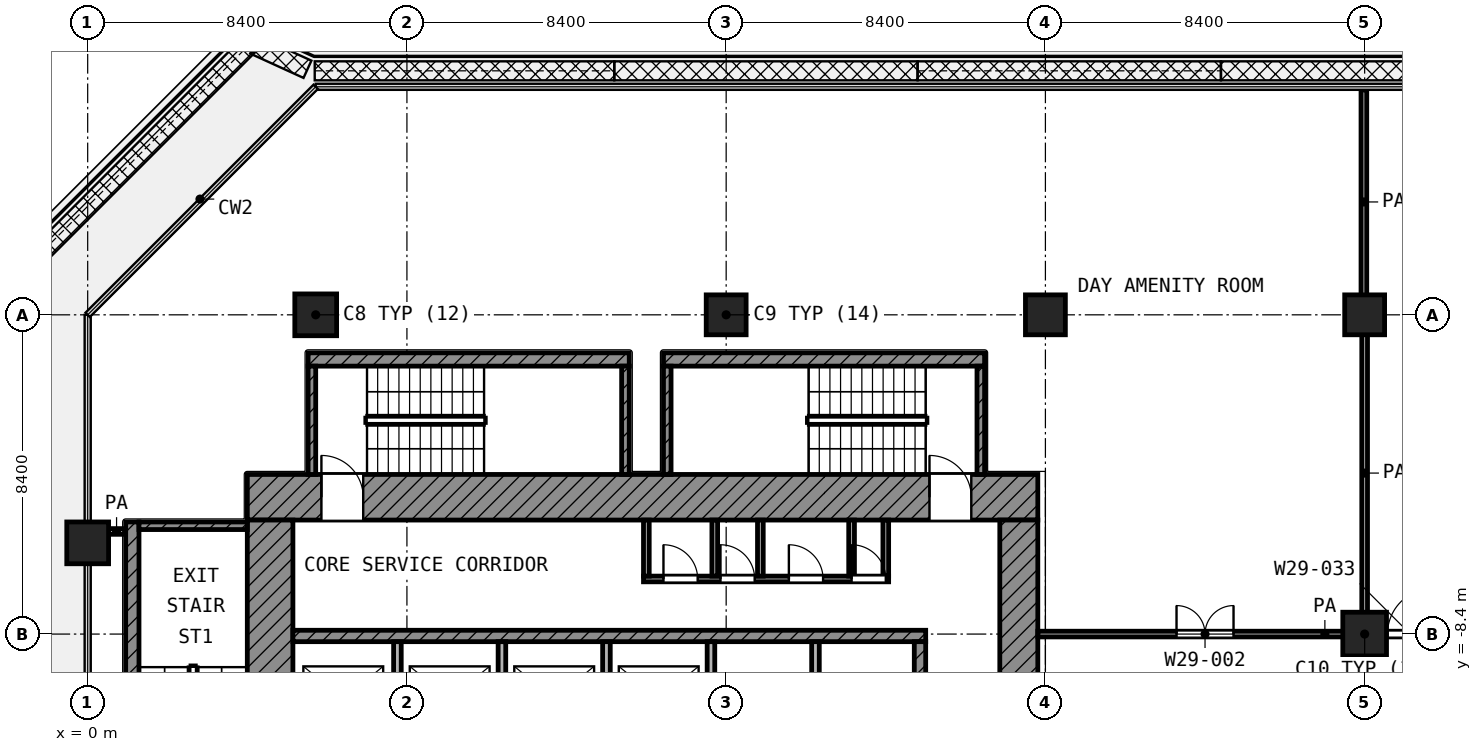
"""IFC4 building model, lengths in metres.
Left out: names, types, materials, properties, quantities, classifications, styles, units other than length and angle.
Written with IfcOpenShell. Run it as: python <this file> out.ifc"""

import sys

from ifc_helpers import new_model, si_unit, direction, frame, frame_2d, origin, origin_2d, place, context, subcontext, project, spatial, rectangle, extrude, element, fill, save


model = new_model("IFC4")
c1 = context("Model", 3, precision=1e-05, world=origin(), true_north=direction((0.0, 1.0)))
c2 = subcontext(c1, "Body", "Model", "MODEL_VIEW")
j1 = project(units=[si_unit("LENGTHUNIT", "METRE"), si_unit("PLANEANGLEUNIT", "RADIAN")], contexts=[c1])
p1 = place(None, origin())
s1 = spatial("IfcSite", under=j1, at=p1, CompositionType="ELEMENT")
p2 = place(p1, origin())
s2 = spatial("IfcBuilding", under=s1, at=p2, CompositionType="ELEMENT")
p3 = place(p2, frame((0.0, 0.0, 128.2)))
s3 = spatial("IfcBuildingStorey", under=s2, at=p3, CompositionType="ELEMENT", Elevation=128.2)
p4 = place(p3, frame((6.0, 0.0, 0.0), z_axis=(0.0, 0.0, 1.0), x_axis=(1.0, 0.0, 0.0)))
e1 = element("IfcColumn", 1, at=p4, inside=s3, PredefinedType="COLUMN", context=c2, shape_type="SweptSolid", body=[
    extrude(rectangle(XDim=1.1, YDim=1.1, at=origin_2d()), origin(), (0.0, 0.0, 1.0), 4.2),
])
for number, where, z_axis, x_axis in (
    (2, (16.8, 0.0, 0.0), (0.0, 0.0, 1.0), (1.0, 0.0, 0.0)),
    (3, (25.2, 0.0, 0.0), (0.0, 0.0, 1.0), (1.0, 0.0, 0.0)),
    (4, (33.6, 0.0, 0.0), (0.0, 0.0, 1.0), (1.0, 0.0, 0.0)),
):
    element("IfcColumn", number, at=place(p3, frame(where, z_axis=z_axis, x_axis=x_axis)), inside=s3, PredefinedType="COLUMN", context=c2, shape_type="SweptSolid", body=[
        extrude(rectangle(XDim=1.05, YDim=1.05, at=origin_2d()), origin(), (0.0, 0.0, 1.0), 4.2),
    ])
p5 = place(p3, frame((0.0, -6.0, 0.0), z_axis=(0.0, 0.0, 1.0), x_axis=(1.0, 0.0, 0.0)))
e5 = element("IfcColumn", 5, at=p5, inside=s3, PredefinedType="COLUMN", context=c2, shape_type="SweptSolid", body=[
    extrude(rectangle(XDim=1.1, YDim=1.1, at=origin_2d()), origin(), (0.0, 0.0, 1.0), 4.2),
])
p6 = place(p3, frame((33.6, -8.4, 0.0), z_axis=(0.0, 0.0, 1.0), x_axis=(1.0, 0.0, 0.0)))
e6 = element("IfcColumn", 6, at=p6, inside=s3, PredefinedType="COLUMN", context=c2, shape_type="SweptSolid", body=[
    extrude(rectangle(XDim=1.15, YDim=1.15, at=origin_2d()), origin(), (0.0, 0.0, 1.0), 4.2),
])
p7 = place(p3, frame((4.2, -4.8, 0.0), z_axis=(0.0, 0.0, 1.0), x_axis=(1.0, 0.0, 0.0)))
e7 = element("IfcWall", 7, at=p7, inside=s3, PredefinedType="SHEAR", context=c2, shape_type="SweptSolid", body=[
    extrude(rectangle(XDim=20.8, YDim=1.2, at=frame_2d((10.4, 0.0))), origin(), (0.0, 0.0, 1.0), 3.6),
])
p8 = place(p7, frame((1.95, 0.0, 0.0)))
e8 = element("IfcOpeningElement", 8, at=p8, cuts=e7, PredefinedType="OPENING", context=c2, shape_type="SweptSolid", body=[
    extrude(rectangle(XDim=1.1, YDim=2.1, at=frame_2d((0.55, 1.05))), frame((0.0, 0.61, 0.0), z_axis=(0.0, -1.0, 0.0), x_axis=(1.0, 0.0, 0.0)), (0.0, 0.0, 1.0), 1.22),
])
p9 = place(p7, frame((17.95, 0.0, 0.0)))
e9 = element("IfcOpeningElement", 9, at=p9, cuts=e7, PredefinedType="OPENING", context=c2, shape_type="SweptSolid", body=[
    extrude(rectangle(XDim=1.1, YDim=2.1, at=frame_2d((0.55, 1.05))), frame((0.0, 0.61, 0.0), z_axis=(0.0, -1.0, 0.0), x_axis=(1.0, 0.0, 0.0)), (0.0, 0.0, 1.0), 1.22),
])
p10 = place(p3, frame((4.8, -25.0, 0.0), z_axis=(0.0, 0.0, 1.0), x_axis=(0.0, 1.0, 0.0)))
e10 = element("IfcWall", 10, at=p10, inside=s3, PredefinedType="SHEAR", context=c2, shape_type="SweptSolid", body=[
    extrude(rectangle(XDim=19.6, YDim=1.2, at=frame_2d((9.8, 0.0))), origin(), (0.0, 0.0, 1.0), 3.6),
])
p11 = place(p10, frame((11.45, 0.0, 0.0)))
e11 = element("IfcOpeningElement", 11, at=p11, cuts=e10, PredefinedType="OPENING", context=c2, shape_type="SweptSolid", body=[
    extrude(rectangle(XDim=1.1, YDim=2.1, at=frame_2d((0.55, 1.05))), frame((0.0, 0.61, 0.0), z_axis=(0.0, -1.0, 0.0), x_axis=(1.0, 0.0, 0.0)), (0.0, 0.0, 1.0), 1.22),
])
p12 = place(p10, frame((2.15, 0.0, 0.0)))
e12 = element("IfcOpeningElement", 12, at=p12, cuts=e10, PredefinedType="OPENING", context=c2, shape_type="SweptSolid", body=[
    extrude(rectangle(XDim=1.1, YDim=2.1, at=frame_2d((0.55, 1.05))), frame((0.0, 0.61, 0.0), z_axis=(0.0, -1.0, 0.0), x_axis=(1.0, 0.0, 0.0)), (0.0, 0.0, 1.0), 1.22),
])
p13 = place(p3, frame((24.5, -24.0, 0.0), z_axis=(0.0, 0.0, 1.0), x_axis=(0.0, 1.0, 0.0)))
e13 = element("IfcWall", 13, at=p13, inside=s3, PredefinedType="SHEAR", context=c2, shape_type="SweptSolid", body=[
    extrude(rectangle(XDim=18.6, YDim=1.0, at=frame_2d((9.3, 0.0))), origin(), (0.0, 0.0, 1.0), 3.6),
])
p14 = place(p13, frame((10.5, 0.0, 0.0)))
e14 = element("IfcOpeningElement", 14, at=p14, cuts=e13, PredefinedType="OPENING", context=c2, shape_type="SweptSolid", body=[
    extrude(rectangle(XDim=1.8, YDim=2.1, at=frame_2d((0.9, 1.05))), frame((0.0, 0.51, 0.0), z_axis=(0.0, -1.0, 0.0), x_axis=(1.0, 0.0, 0.0)), (0.0, 0.0, 1.0), 1.02),
])
p15 = place(p3, frame((5.4, -8.45, 0.0), z_axis=(0.0, 0.0, 1.0), x_axis=(1.0, 0.0, 0.0)))
e15 = element("IfcWall", 15, at=p15, inside=s3, PredefinedType="SHEAR", context=c2, shape_type="SweptSolid", body=[
    extrude(rectangle(XDim=16.65, YDim=0.3, at=frame_2d((8.325, 0.0))), origin(), (0.0, 0.0, 1.0), 3.6),
])
p16 = place(p3, frame((21.9, -10.95, 0.0), z_axis=(0.0, 0.0, 1.0), x_axis=(0.0, 1.0, 0.0)))
e16 = element("IfcWall", 16, at=p16, inside=s3, PredefinedType="SHEAR", context=c2, shape_type="SweptSolid", body=[
    extrude(rectangle(XDim=2.35, YDim=0.3, at=frame_2d((1.175, 0.0))), origin(), (0.0, 0.0, 1.0), 3.6),
])
for number, where, z_axis, x_axis in (
    (17, (8.15, -10.95, 0.0), (0.0, 0.0, 1.0), (0.0, 1.0, 0.0)),
    (18, (10.9, -10.95, 0.0), (0.0, 0.0, 1.0), (0.0, 1.0, 0.0)),
    (19, (13.65, -10.95, 0.0), (0.0, 0.0, 1.0), (0.0, 1.0, 0.0)),
    (20, (16.4, -10.95, 0.0), (0.0, 0.0, 1.0), (0.0, 1.0, 0.0)),
    (21, (19.15, -10.95, 0.0), (0.0, 0.0, 1.0), (0.0, 1.0, 0.0)),
):
    element("IfcWall", number, at=place(p3, frame(where, z_axis=z_axis, x_axis=x_axis)), inside=s3, PredefinedType="PARTITIONING", context=c2, shape_type="SweptSolid", body=[
        extrude(rectangle(XDim=2.35, YDim=0.2, at=frame_2d((1.175, 0.0))), origin(), (0.0, 0.0, 1.0), 3.6),
    ])
p17 = place(p3, frame((14.625, -6.95, 0.0), z_axis=(0.0, 0.0, 1.0), x_axis=(1.0, 0.0, 0.0)))
e22 = element("IfcWall", 22, at=p17, inside=s3, PredefinedType="PARTITIONING", context=c2, shape_type="SweptSolid", body=[
    extrude(rectangle(XDim=6.45, YDim=0.15, at=frame_2d((3.225, 0.0))), origin(), (0.0, 0.0, 1.0), 3.6),
])
p18 = place(p17, frame((0.525, 0.0, 0.0)))
e23 = element("IfcOpeningElement", 23, at=p18, cuts=e22, PredefinedType="OPENING", context=c2, shape_type="SweptSolid", body=[
    extrude(rectangle(XDim=0.9, YDim=2.1, at=frame_2d((0.45, 1.05))), frame((0.0, 0.085, 0.0), z_axis=(0.0, -1.0, 0.0), x_axis=(1.0, 0.0, 0.0)), (0.0, 0.0, 1.0), 0.17),
])
p19 = place(p17, frame((2.025, 0.0, 0.0)))
e24 = element("IfcOpeningElement", 24, at=p19, cuts=e22, PredefinedType="OPENING", context=c2, shape_type="SweptSolid", body=[
    extrude(rectangle(XDim=0.9, YDim=2.1, at=frame_2d((0.45, 1.05))), frame((0.0, 0.085, 0.0), z_axis=(0.0, -1.0, 0.0), x_axis=(1.0, 0.0, 0.0)), (0.0, 0.0, 1.0), 0.17),
])
p20 = place(p17, frame((3.825, 0.0, 0.0)))
e25 = element("IfcOpeningElement", 25, at=p20, cuts=e22, PredefinedType="OPENING", context=c2, shape_type="SweptSolid", body=[
    extrude(rectangle(XDim=0.9, YDim=2.1, at=frame_2d((0.45, 1.05))), frame((0.0, 0.085, 0.0), z_axis=(0.0, -1.0, 0.0), x_axis=(1.0, 0.0, 0.0)), (0.0, 0.0, 1.0), 0.17),
])
p21 = place(p17, frame((5.475, 0.0, 0.0)))
e26 = element("IfcOpeningElement", 26, at=p21, cuts=e22, PredefinedType="OPENING", context=c2, shape_type="SweptSolid", body=[
    extrude(rectangle(XDim=0.9, YDim=2.1, at=frame_2d((0.45, 1.05))), frame((0.0, 0.085, 0.0), z_axis=(0.0, -1.0, 0.0), x_axis=(1.0, 0.0, 0.0)), (0.0, 0.0, 1.0), 0.17),
])
for number, where, z_axis, x_axis in (
    (27, (14.7, -6.875, 0.0), (0.0, 0.0, 1.0), (0.0, 1.0, 0.0)),
    (28, (16.5, -6.875, 0.0), (0.0, 0.0, 1.0), (0.0, 1.0, 0.0)),
    (29, (17.7, -6.875, 0.0), (0.0, 0.0, 1.0), (0.0, 1.0, 0.0)),
    (30, (20.1, -6.875, 0.0), (0.0, 0.0, 1.0), (0.0, 1.0, 0.0)),
    (31, (21.0, -6.875, 0.0), (0.0, 0.0, 1.0), (0.0, 1.0, 0.0)),
):
    element("IfcWall", number, at=place(p3, frame(where, z_axis=z_axis, x_axis=x_axis)), inside=s3, PredefinedType="PARTITIONING", context=c2, shape_type="SweptSolid", body=[
        extrude(rectangle(XDim=1.475, YDim=0.15, at=frame_2d((0.738, 0.0))), origin(), (0.0, 0.0, 1.0), 3.6),
    ])
p22 = place(p3, frame((1.175, -13.9, 0.0), z_axis=(0.0, 0.0, 1.0), x_axis=(0.0, 1.0, 0.0)))
e32 = element("IfcWall", 32, at=p22, inside=s3, PredefinedType="SHEAR", context=c2, shape_type="SweptSolid", body=[
    extrude(rectangle(XDim=8.45, YDim=0.35, at=frame_2d((4.225, 0.0))), origin(), (0.0, 0.0, 1.0), 3.6),
])
p23 = place(p3, frame((1.35, -5.55, 0.0), z_axis=(0.0, 0.0, 1.0), x_axis=(1.0, 0.0, 0.0)))
e33 = element("IfcWall", 33, at=p23, inside=s3, PredefinedType="SHEAR", context=c2, shape_type="SweptSolid", body=[
    extrude(rectangle(XDim=2.85, YDim=0.2, at=frame_2d((1.425, 0.0))), origin(), (0.0, 0.0, 1.0), 3.6),
])
p24 = place(p3, frame((5.8, -1.175, 0.0), z_axis=(0.0, 0.0, 1.0), x_axis=(1.0, 0.0, 0.0)))
e34 = element("IfcWall", 34, at=p24, inside=s3, PredefinedType="SHEAR", context=c2, shape_type="SweptSolid", body=[
    extrude(rectangle(XDim=8.45, YDim=0.35, at=frame_2d((4.225, 0.0))), origin(), (0.0, 0.0, 1.0), 3.6),
])
for number, where, z_axis, x_axis in (
    (35, (5.9, -4.2, 0.0), (0.0, 0.0, 1.0), (0.0, 1.0, 0.0)),
    (36, (14.15, -4.2, 0.0), (0.0, 0.0, 1.0), (0.0, 1.0, 0.0)),
):
    element("IfcWall", number, at=place(p3, frame(where, z_axis=z_axis, x_axis=x_axis)), inside=s3, PredefinedType="SHEAR", context=c2, shape_type="SweptSolid", body=[
        extrude(rectangle(XDim=2.85, YDim=0.2, at=frame_2d((1.425, 0.0))), origin(), (0.0, 0.0, 1.0), 3.6),
    ])
p25 = place(p3, frame((15.15, -1.175, 0.0), z_axis=(0.0, 0.0, 1.0), x_axis=(1.0, 0.0, 0.0)))
e37 = element("IfcWall", 37, at=p25, inside=s3, PredefinedType="SHEAR", context=c2, shape_type="SweptSolid", body=[
    extrude(rectangle(XDim=8.45, YDim=0.35, at=frame_2d((4.225, 0.0))), origin(), (0.0, 0.0, 1.0), 3.6),
])
for number, where, z_axis, x_axis in (
    (38, (15.25, -4.2, 0.0), (0.0, 0.0, 1.0), (0.0, 1.0, 0.0)),
    (39, (23.5, -4.2, 0.0), (0.0, 0.0, 1.0), (0.0, 1.0, 0.0)),
):
    element("IfcWall", number, at=place(p3, frame(where, z_axis=z_axis, x_axis=x_axis)), inside=s3, PredefinedType="SHEAR", context=c2, shape_type="SweptSolid", body=[
        extrude(rectangle(XDim=2.85, YDim=0.2, at=frame_2d((1.425, 0.0))), origin(), (0.0, 0.0, 1.0), 3.6),
    ])
p26 = place(p3, frame((25.0, -8.4, 0.0), z_axis=(0.0, 0.0, 1.0), x_axis=(1.0, 0.0, 0.0)))
e40 = element("IfcWall", 40, at=p26, inside=s3, PredefinedType="PARTITIONING", context=c2, shape_type="SweptSolid", body=[
    extrude(rectangle(XDim=15.107, YDim=0.15, at=frame_2d((7.553, 0.0))), origin(), (0.0, 0.0, 1.0), 3.6),
])
p27 = place(p26, frame((3.65, 0.0, 0.0)))
e41 = element("IfcOpeningElement", 41, at=p27, cuts=e40, PredefinedType="OPENING", context=c2, shape_type="SweptSolid", body=[
    extrude(rectangle(XDim=1.5, YDim=2.1, at=frame_2d((0.75, 1.05))), frame((0.0, 0.085, 0.0), z_axis=(0.0, -1.0, 0.0), x_axis=(1.0, 0.0, 0.0)), (0.0, 0.0, 1.0), 0.17),
])
p28 = place(p26, frame((9.2, 0.0, 0.0)))
e42 = element("IfcOpeningElement", 42, at=p28, cuts=e40, PredefinedType="OPENING", context=c2, shape_type="SweptSolid", body=[
    extrude(rectangle(XDim=1.2, YDim=2.1, at=frame_2d((0.6, 1.05))), frame((0.0, 0.085, 0.0), z_axis=(0.0, -1.0, 0.0), x_axis=(1.0, 0.0, 0.0)), (0.0, 0.0, 1.0), 0.17),
])
p29 = place(p3, frame((0.55, -5.7, 0.0), z_axis=(0.0, 0.0, 1.0), x_axis=(1.0, 0.0, 0.0)))
e43 = element("IfcWall", 43, at=p29, inside=s3, PredefinedType="PARTITIONING", context=c2, shape_type="SweptSolid", body=[
    extrude(rectangle(XDim=0.42, YDim=0.15, at=frame_2d((0.21, 0.0))), origin(), (0.0, 0.0, 1.0), 3.6),
])
p30 = place(p3, frame((33.58, 0.02, 0.0), z_axis=(0.0, 0.0, 1.0), x_axis=(0.0, 1.0, 0.0)))
e44 = element("IfcWall", 44, at=p30, inside=s3, PredefinedType="PARTITIONING", context=c2, shape_type="SweptSolid", body=[
    extrude(rectangle(XDim=5.9, YDim=0.15, at=frame_2d((2.95, 0.0))), origin(), (0.0, 0.0, 1.0), 3.6),
])
p31 = place(p3, frame((33.6, -8.325, 0.0), z_axis=(0.0, 0.0, 1.0), x_axis=(0.0, 1.0, 0.0)))
e45 = element("IfcWall", 45, at=p31, inside=s3, PredefinedType="PARTITIONING", context=c2, shape_type="SweptSolid", body=[
    extrude(rectangle(XDim=8.322, YDim=0.15, at=frame_2d((4.161, 0.0))), origin(), (0.0, 0.0, 1.0), 3.6),
])
p32 = place(p8, origin())
e46 = element("IfcDoor", 46, at=p32, inside=s3, OperationType="SINGLE_SWING_LEFT", PredefinedType="DOOR", context=c2, shape_type="SweptSolid", body=[
    extrude(rectangle(XDim=1.1, YDim=2.1, at=frame_2d((0.55, 1.05))), frame((0.0, 0.025, 0.0), z_axis=(0.0, -1.0, 0.0), x_axis=(1.0, 0.0, 0.0)), (0.0, 0.0, 1.0), 0.05),
])
fill(e8, e46)
p33 = place(p9, origin())
e47 = element("IfcDoor", 47, at=p33, inside=s3, OperationType="SINGLE_SWING_LEFT", PredefinedType="DOOR", context=c2, shape_type="SweptSolid", body=[
    extrude(rectangle(XDim=1.1, YDim=2.1, at=frame_2d((0.55, 1.05))), frame((0.0, 0.025, 0.0), z_axis=(0.0, -1.0, 0.0), x_axis=(1.0, 0.0, 0.0)), (0.0, 0.0, 1.0), 0.05),
])
fill(e9, e47)
p34 = place(p18, origin())
e48 = element("IfcDoor", 48, at=p34, inside=s3, OperationType="SINGLE_SWING_LEFT", PredefinedType="DOOR", context=c2, shape_type="SweptSolid", body=[
    extrude(rectangle(XDim=0.9, YDim=2.1, at=frame_2d((0.45, 1.05))), frame((0.0, 0.025, 0.0), z_axis=(0.0, -1.0, 0.0), x_axis=(1.0, 0.0, 0.0)), (0.0, 0.0, 1.0), 0.05),
])
fill(e23, e48)
p35 = place(p19, origin())
e49 = element("IfcDoor", 49, at=p35, inside=s3, OperationType="SINGLE_SWING_LEFT", PredefinedType="DOOR", context=c2, shape_type="SweptSolid", body=[
    extrude(rectangle(XDim=0.9, YDim=2.1, at=frame_2d((0.45, 1.05))), frame((0.0, 0.025, 0.0), z_axis=(0.0, -1.0, 0.0), x_axis=(1.0, 0.0, 0.0)), (0.0, 0.0, 1.0), 0.05),
])
fill(e24, e49)
p36 = place(p20, origin())
e50 = element("IfcDoor", 50, at=p36, inside=s3, OperationType="SINGLE_SWING_LEFT", PredefinedType="DOOR", context=c2, shape_type="SweptSolid", body=[
    extrude(rectangle(XDim=0.9, YDim=2.1, at=frame_2d((0.45, 1.05))), frame((0.0, 0.025, 0.0), z_axis=(0.0, -1.0, 0.0), x_axis=(1.0, 0.0, 0.0)), (0.0, 0.0, 1.0), 0.05),
])
fill(e25, e50)
p37 = place(p21, origin())
e51 = element("IfcDoor", 51, at=p37, inside=s3, OperationType="SINGLE_SWING_LEFT", PredefinedType="DOOR", context=c2, shape_type="SweptSolid", body=[
    extrude(rectangle(XDim=0.9, YDim=2.1, at=frame_2d((0.45, 1.05))), frame((0.0, 0.025, 0.0), z_axis=(0.0, -1.0, 0.0), x_axis=(1.0, 0.0, 0.0)), (0.0, 0.0, 1.0), 0.05),
])
fill(e26, e51)
p38 = place(p27, origin())
e52 = element("IfcDoor", 52, at=p38, inside=s3, OperationType="DOUBLE_DOOR_SINGLE_SWING", PredefinedType="DOOR", context=c2, shape_type="SweptSolid", body=[
    extrude(rectangle(XDim=1.5, YDim=2.1, at=frame_2d((0.75, 1.05))), frame((0.0, 0.025, 0.0), z_axis=(0.0, -1.0, 0.0), x_axis=(1.0, 0.0, 0.0)), (0.0, 0.0, 1.0), 0.05),
])
fill(e41, e52)
p39 = place(p28, origin())
e53 = element("IfcDoor", 53, at=p39, inside=s3, OperationType="SINGLE_SWING_RIGHT", PredefinedType="DOOR", context=c2, shape_type="SweptSolid", body=[
    extrude(rectangle(XDim=1.2, YDim=2.1, at=frame_2d((0.6, 1.05))), frame((0.0, 0.025, 0.0), z_axis=(0.0, -1.0, 0.0), x_axis=(1.0, 0.0, 0.0)), (0.0, 0.0, 1.0), 0.05),
])
fill(e42, e53)
save(model, sys.argv[1])
